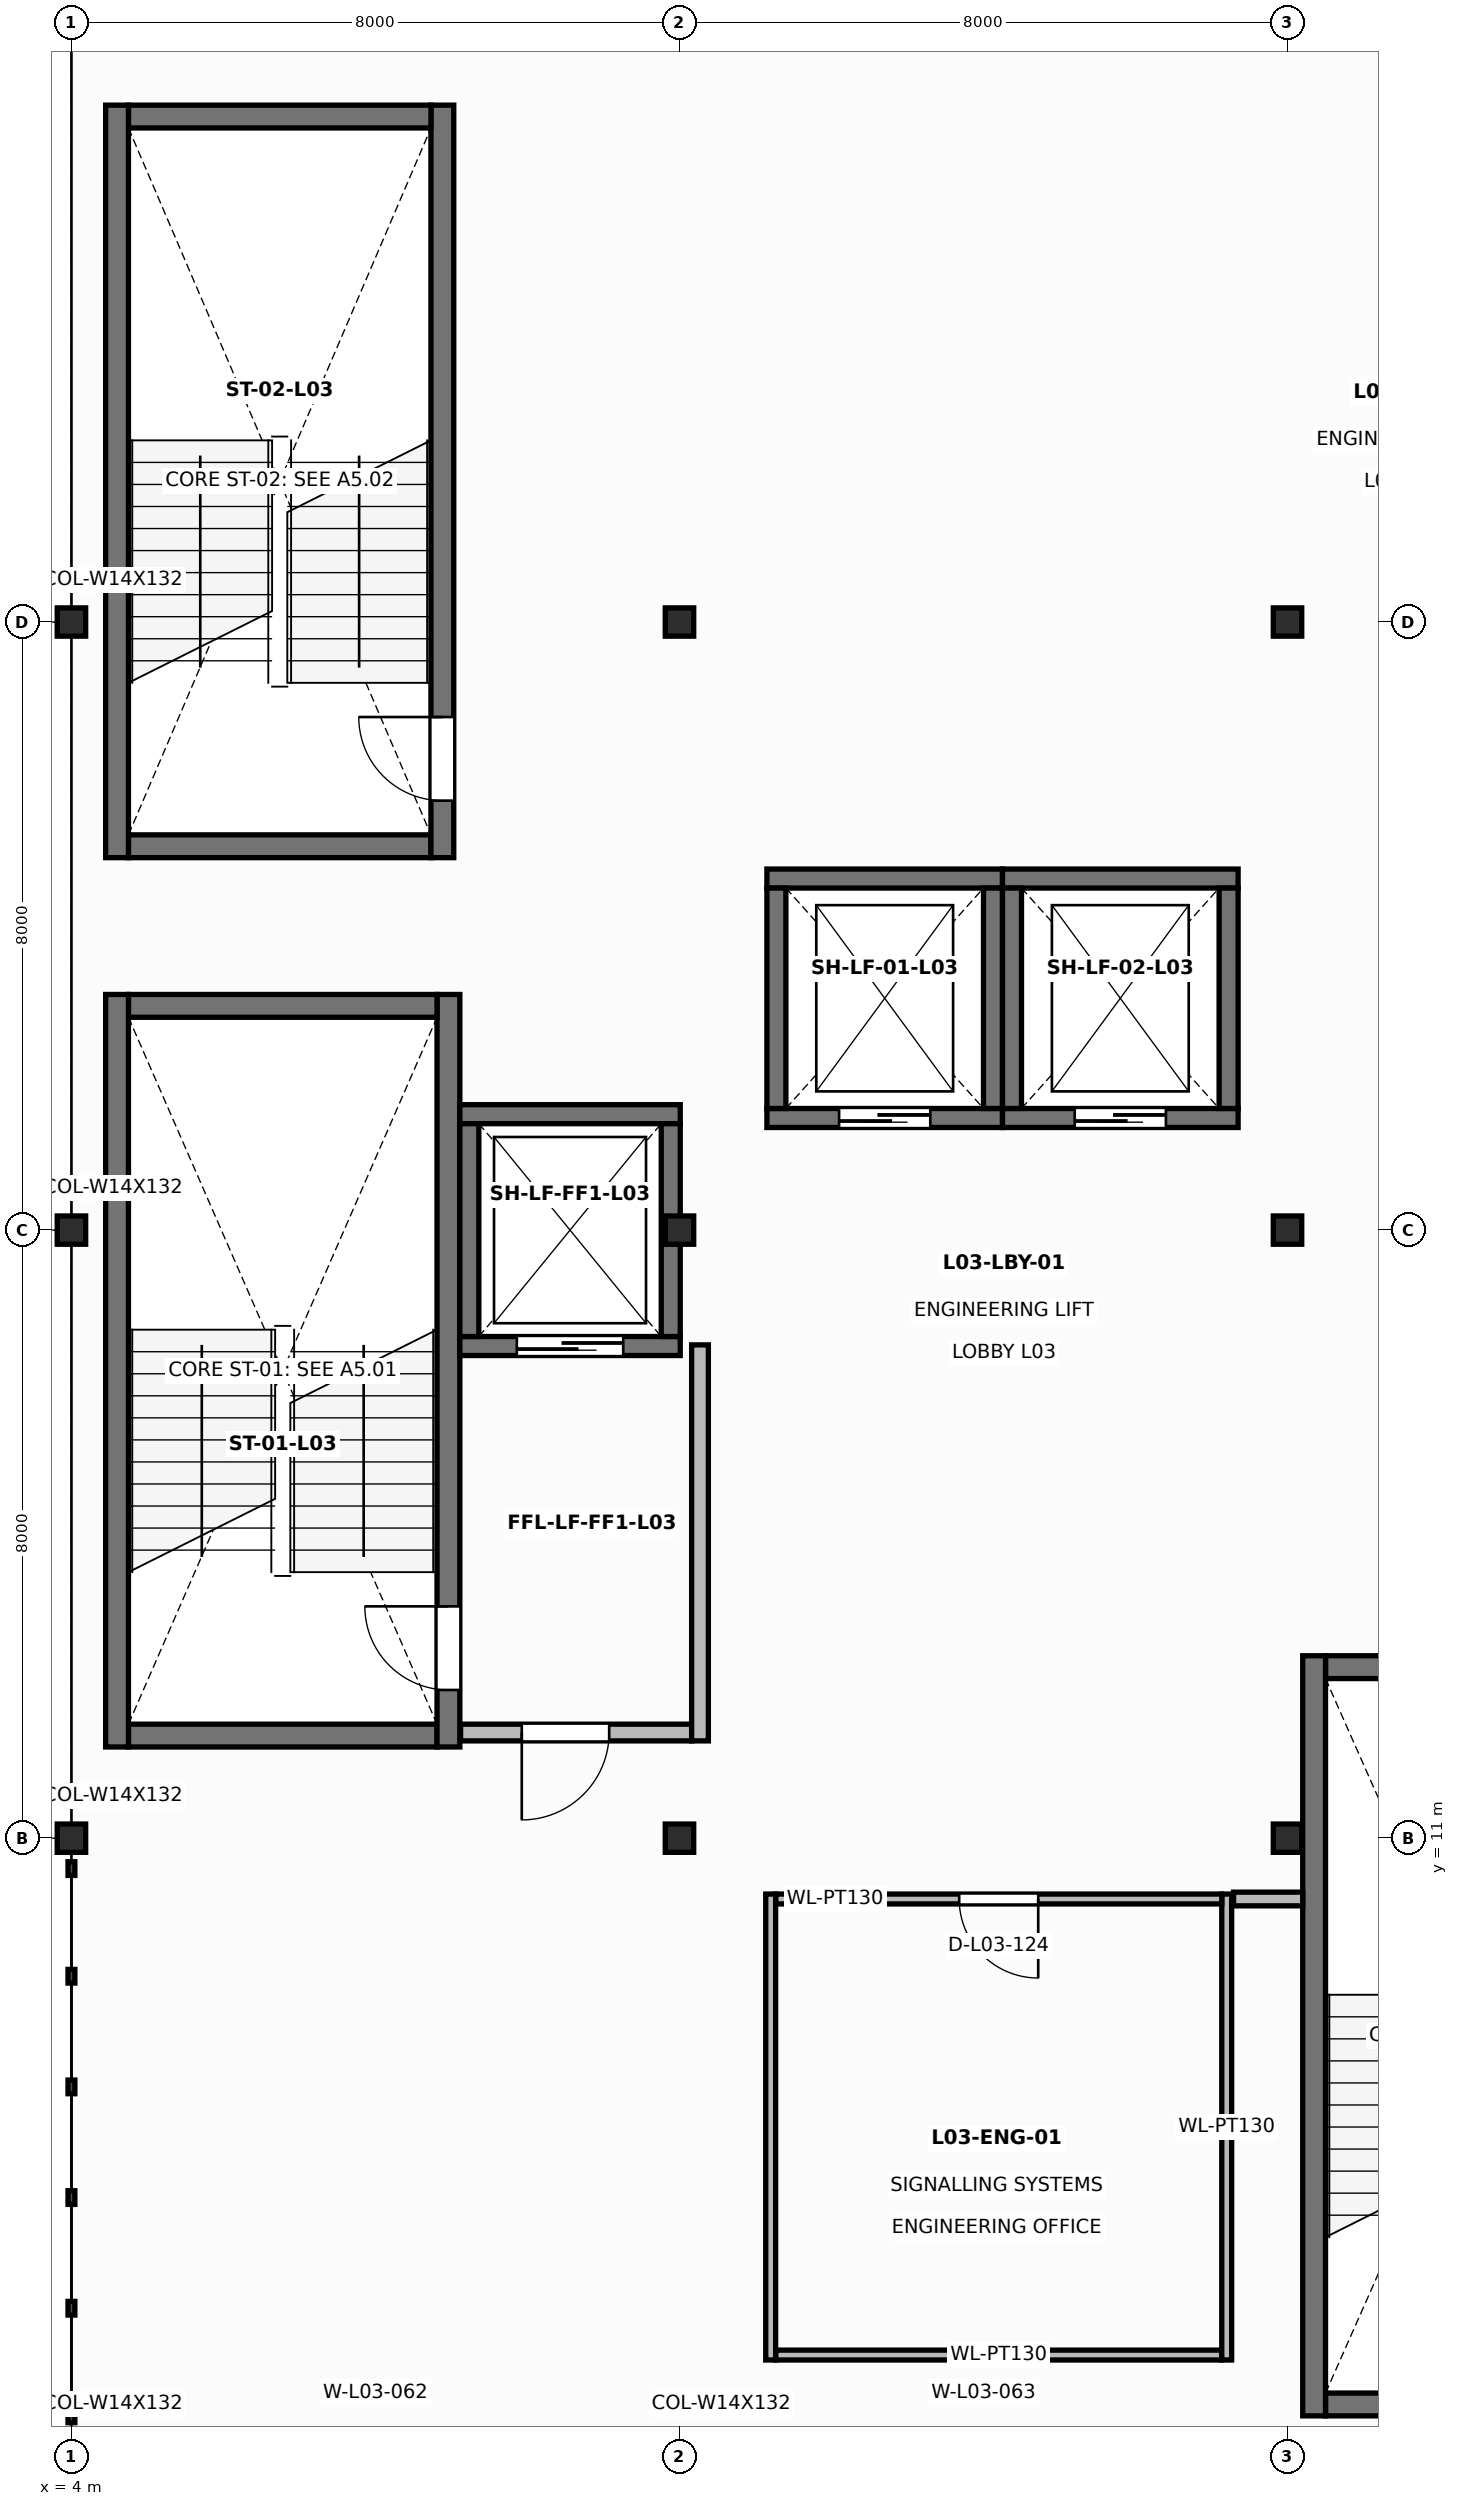
"""IFC4 building model, lengths in metres.
Left out: names, types, materials, properties, quantities, classifications, styles, units other than length and angle.
Written with IfcOpenShell. Run it as: python <this file> out.ifc"""

import sys

from ifc_helpers import new_model, si_unit, direction, frame, frame_2d, origin, origin_2d, place, context, subcontext, project, spatial, rectangle, i_section, extrude, element, fill, save


model = new_model("IFC4")
c1 = context("Model", 3, precision=1e-05, world=origin(), true_north=direction((0.0, 1.0)))
c2 = subcontext(c1, "Body", "Model", "MODEL_VIEW")
j1 = project(units=[si_unit("LENGTHUNIT", "METRE"), si_unit("PLANEANGLEUNIT", "RADIAN")], contexts=[c1])
p1 = place(None, origin())
s1 = spatial("IfcSite", under=j1, at=p1, CompositionType="ELEMENT")
p2 = place(p1, origin())
s2 = spatial("IfcBuilding", under=s1, at=p2, CompositionType="ELEMENT")
p3 = place(p2, frame((0.0, 0.0, 15.6)))
s3 = spatial("IfcBuildingStorey", under=s2, at=p3, CompositionType="ELEMENT", Elevation=15.6)
for number, where, z_axis, x_axis in (
    (1, (4.0, 11.0, 0.0), (0.0, 0.0, 1.0), (1.0, 0.0, 0.0)),
    (2, (4.0, 19.0, 0.0), (0.0, 0.0, 1.0), (1.0, 0.0, 0.0)),
    (3, (4.0, 27.0, 0.0), (0.0, 0.0, 1.0), (1.0, 0.0, 0.0)),
    (4, (12.0, 11.0, 0.0), (0.0, 0.0, 1.0), (1.0, 0.0, 0.0)),
    (5, (12.0, 19.0, 0.0), (0.0, 0.0, 1.0), (1.0, 0.0, 0.0)),
    (6, (12.0, 27.0, 0.0), (0.0, 0.0, 1.0), (1.0, 0.0, 0.0)),
    (7, (20.0, 11.0, 0.0), (0.0, 0.0, 1.0), (1.0, 0.0, 0.0)),
    (8, (20.0, 19.0, 0.0), (0.0, 0.0, 1.0), (1.0, 0.0, 0.0)),
    (9, (20.0, 27.0, 0.0), (0.0, 0.0, 1.0), (1.0, 0.0, 0.0)),
):
    element("IfcColumn", number, at=place(p3, frame(where, z_axis=z_axis, x_axis=x_axis)), inside=s3, PredefinedType="COLUMN", context=c2, shape_type="SweptSolid", body=[
        extrude(i_section(OverallWidth=0.374, OverallDepth=0.372, WebThickness=0.016, FlangeThickness=0.026, at=origin_2d()), origin(), (0.0, 0.0, 1.0), 4.2),
    ])
p4 = place(p3, frame((4.75, 12.35, 0.0), z_axis=(0.0, 0.0, 1.0), x_axis=(1.0, 0.0, 0.0)))
e10 = element("IfcWall", 10, at=p4, inside=s3, PredefinedType="SHEAR", context=c2, shape_type="SweptSolid", body=[
    extrude(rectangle(XDim=4.06, YDim=0.3, at=frame_2d((2.03, 0.0))), origin(), (0.0, 0.0, 1.0), 3.975),
])
p5 = place(p3, frame((8.96, 12.2, 0.0), z_axis=(0.0, 0.0, 1.0), x_axis=(0.0, 1.0, 0.0)))
e11 = element("IfcWall", 11, at=p5, inside=s3, PredefinedType="SHEAR", context=c2, shape_type="SweptSolid", body=[
    extrude(rectangle(XDim=9.9, YDim=0.3, at=frame_2d((4.95, 0.0))), origin(), (0.0, 0.0, 1.0), 3.975),
])
p6 = place(p5, frame((0.75, 0.0, 0.0)))
e12 = element("IfcOpeningElement", 12, at=p6, cuts=e11, PredefinedType="OPENING", context=c2, shape_type="SweptSolid", body=[
    extrude(rectangle(XDim=1.1, YDim=2.15, at=frame_2d((0.55, 1.075))), frame((0.0, 0.16, 0.0), z_axis=(0.0, -1.0, 0.0), x_axis=(1.0, 0.0, 0.0)), (0.0, 0.0, 1.0), 0.32),
])
p7 = place(p3, frame((8.81, 21.95, 0.0), z_axis=(0.0, 0.0, 1.0), x_axis=(-1.0, 0.0, 0.0)))
e13 = element("IfcWall", 13, at=p7, inside=s3, PredefinedType="SHEAR", context=c2, shape_type="SweptSolid", body=[
    extrude(rectangle(XDim=4.06, YDim=0.3, at=frame_2d((2.03, 0.0))), origin(), (0.0, 0.0, 1.0), 3.975),
])
p8 = place(p3, frame((4.6, 22.1, 0.0), z_axis=(0.0, 0.0, 1.0), x_axis=(0.0, -1.0, 0.0)))
e14 = element("IfcWall", 14, at=p8, inside=s3, PredefinedType="SHEAR", context=c2, shape_type="SweptSolid", body=[
    extrude(rectangle(XDim=9.9, YDim=0.3, at=frame_2d((4.95, 0.0))), origin(), (0.0, 0.0, 1.0), 3.975),
])
p9 = place(p3, frame((4.75, 24.05, 0.0), z_axis=(0.0, 0.0, 1.0), x_axis=(1.0, 0.0, 0.0)))
e15 = element("IfcWall", 15, at=p9, inside=s3, PredefinedType="SHEAR", context=c2, shape_type="SweptSolid", body=[
    extrude(rectangle(XDim=3.98, YDim=0.3, at=frame_2d((1.99, 0.0))), origin(), (0.0, 0.0, 1.0), 3.975),
])
p10 = place(p3, frame((8.88, 23.9, 0.0), z_axis=(0.0, 0.0, 1.0), x_axis=(0.0, 1.0, 0.0)))
e16 = element("IfcWall", 16, at=p10, inside=s3, PredefinedType="SHEAR", context=c2, shape_type="SweptSolid", body=[
    extrude(rectangle(XDim=9.9, YDim=0.3, at=frame_2d((4.95, 0.0))), origin(), (0.0, 0.0, 1.0), 3.975),
])
p11 = place(p10, frame((0.75, 0.0, 0.0)))
e17 = element("IfcOpeningElement", 17, at=p11, cuts=e16, PredefinedType="OPENING", context=c2, shape_type="SweptSolid", body=[
    extrude(rectangle(XDim=1.1, YDim=2.15, at=frame_2d((0.55, 1.075))), frame((0.0, 0.16, 0.0), z_axis=(0.0, -1.0, 0.0), x_axis=(1.0, 0.0, 0.0)), (0.0, 0.0, 1.0), 0.32),
])
p12 = place(p3, frame((8.73, 33.65, 0.0), z_axis=(0.0, 0.0, 1.0), x_axis=(-1.0, 0.0, 0.0)))
e18 = element("IfcWall", 18, at=p12, inside=s3, PredefinedType="SHEAR", context=c2, shape_type="SweptSolid", body=[
    extrude(rectangle(XDim=3.98, YDim=0.3, at=frame_2d((1.99, 0.0))), origin(), (0.0, 0.0, 1.0), 3.975),
])
p13 = place(p3, frame((4.6, 33.8, 0.0), z_axis=(0.0, 0.0, 1.0), x_axis=(0.0, -1.0, 0.0)))
e19 = element("IfcWall", 19, at=p13, inside=s3, PredefinedType="SHEAR", context=c2, shape_type="SweptSolid", body=[
    extrude(rectangle(XDim=9.9, YDim=0.3, at=frame_2d((4.95, 0.0))), origin(), (0.0, 0.0, 1.0), 3.975),
])
for number, where, z_axis, x_axis in (
    (20, (20.5, 3.55, 0.0), (0.0, 0.0, 1.0), (1.0, 0.0, 0.0)),
    (21, (24.66, 13.25, 0.0), (0.0, 0.0, 1.0), (-1.0, 0.0, 0.0)),
):
    element("IfcWall", number, at=place(p3, frame(where, z_axis=z_axis, x_axis=x_axis)), inside=s3, PredefinedType="SHEAR", context=c2, shape_type="SweptSolid", body=[
        extrude(rectangle(XDim=4.16, YDim=0.3, at=frame_2d((2.08, 0.0))), origin(), (0.0, 0.0, 1.0), 3.975),
    ])
p14 = place(p3, frame((20.35, 13.4, 0.0), z_axis=(0.0, 0.0, 1.0), x_axis=(0.0, -1.0, 0.0)))
e22 = element("IfcWall", 22, at=p14, inside=s3, PredefinedType="SHEAR", context=c2, shape_type="SweptSolid", body=[
    extrude(rectangle(XDim=10.0, YDim=0.3, at=frame_2d((5.0, 0.0))), origin(), (0.0, 0.0, 1.0), 3.975),
])
p15 = place(p3, frame((9.11, 17.475, 0.0), z_axis=(0.0, 0.0, 1.0), x_axis=(1.0, 0.0, 0.0)))
e23 = element("IfcWall", 23, at=p15, inside=s3, PredefinedType="SOLIDWALL", context=c2, shape_type="SweptSolid", body=[
    extrude(rectangle(XDim=2.9, YDim=0.25, at=frame_2d((1.45, 0.0))), origin(), (0.0, 0.0, 1.0), 3.975),
])
p16 = place(p15, frame((0.75, 0.0, 0.0)))
e24 = element("IfcOpeningElement", 24, at=p16, cuts=e23, PredefinedType="OPENING", context=c2, shape_type="SweptSolid", body=[
    extrude(rectangle(XDim=1.4, YDim=2.25, at=frame_2d((0.7, 1.125))), frame((0.0, 0.135, 0.0), z_axis=(0.0, -1.0, 0.0), x_axis=(1.0, 0.0, 0.0)), (0.0, 0.0, 1.0), 0.27),
])
p17 = place(p3, frame((12.01, 20.525, 0.0), z_axis=(0.0, 0.0, 1.0), x_axis=(-1.0, 0.0, 0.0)))
e25 = element("IfcWall", 25, at=p17, inside=s3, PredefinedType="SOLIDWALL", context=c2, shape_type="SweptSolid", body=[
    extrude(rectangle(XDim=2.9, YDim=0.25, at=frame_2d((1.45, 0.0))), origin(), (0.0, 0.0, 1.0), 3.975),
])
for number, where, z_axis, x_axis in (
    (26, (11.885, 17.6, 0.0), (0.0, 0.0, 1.0), (0.0, 1.0, 0.0)),
    (27, (9.235, 20.4, 0.0), (0.0, 0.0, 1.0), (0.0, -1.0, 0.0)),
):
    element("IfcWall", number, at=place(p3, frame(where, z_axis=z_axis, x_axis=x_axis)), inside=s3, PredefinedType="SOLIDWALL", context=c2, shape_type="SweptSolid", body=[
        extrude(rectangle(XDim=2.8, YDim=0.25, at=frame_2d((1.4, 0.0))), origin(), (0.0, 0.0, 1.0), 3.975),
    ])
p18 = place(p3, frame((9.12, 12.39, 0.0), z_axis=(0.0, 0.0, 1.0), x_axis=(1.0, 0.0, 0.0)))
e28 = element("IfcWall", 28, at=p18, inside=s3, PredefinedType="SOLIDWALL", context=c2, shape_type="SweptSolid", body=[
    extrude(rectangle(XDim=3.04, YDim=0.22, at=frame_2d((1.52, 0.0))), origin(), (0.0, 0.0, 1.0), 3.358),
])
p19 = place(p18, frame((0.805, 0.0, 0.0)))
e29 = element("IfcOpeningElement", 29, at=p19, cuts=e28, PredefinedType="OPENING", context=c2, shape_type="SweptSolid", body=[
    extrude(rectangle(XDim=1.15, YDim=2.15, at=frame_2d((0.575, 1.075))), frame((0.0, 0.12, 0.0), z_axis=(0.0, -1.0, 0.0), x_axis=(1.0, 0.0, 0.0)), (0.0, 0.0, 1.0), 0.24),
])
p20 = place(p3, frame((12.27, 12.28, 0.0), z_axis=(0.0, 0.0, 1.0), x_axis=(0.0, 1.0, 0.0)))
e30 = element("IfcWall", 30, at=p20, inside=s3, PredefinedType="SOLIDWALL", context=c2, shape_type="SweptSolid", body=[
    extrude(rectangle(XDim=5.21, YDim=0.22, at=frame_2d((2.605, 0.0))), origin(), (0.0, 0.0, 1.0), 3.975),
])
p21 = place(p3, frame((13.15, 20.475, 0.0), z_axis=(0.0, 0.0, 1.0), x_axis=(1.0, 0.0, 0.0)))
e31 = element("IfcWall", 31, at=p21, inside=s3, PredefinedType="SOLIDWALL", context=c2, shape_type="SweptSolid", body=[
    extrude(rectangle(XDim=3.1, YDim=0.25, at=frame_2d((1.55, 0.0))), origin(), (0.0, 0.0, 1.0), 3.975),
])
p22 = place(p21, frame((0.95, 0.0, 0.0)))
e32 = element("IfcOpeningElement", 32, at=p22, cuts=e31, PredefinedType="OPENING", context=c2, shape_type="SweptSolid", body=[
    extrude(rectangle(XDim=1.2, YDim=2.2, at=frame_2d((0.6, 1.1))), frame((0.0, 0.135, 0.0), z_axis=(0.0, -1.0, 0.0), x_axis=(1.0, 0.0, 0.0)), (0.0, 0.0, 1.0), 0.27),
])
p23 = place(p3, frame((16.25, 23.625, 0.0), z_axis=(0.0, 0.0, 1.0), x_axis=(-1.0, 0.0, 0.0)))
e33 = element("IfcWall", 33, at=p23, inside=s3, PredefinedType="SOLIDWALL", context=c2, shape_type="SweptSolid", body=[
    extrude(rectangle(XDim=3.1, YDim=0.25, at=frame_2d((1.55, 0.0))), origin(), (0.0, 0.0, 1.0), 3.975),
])
for number, where, z_axis, x_axis in (
    (34, (16.125, 20.6, 0.0), (0.0, 0.0, 1.0), (0.0, 1.0, 0.0)),
    (35, (13.275, 23.5, 0.0), (0.0, 0.0, 1.0), (0.0, -1.0, 0.0)),
):
    element("IfcWall", number, at=place(p3, frame(where, z_axis=z_axis, x_axis=x_axis)), inside=s3, PredefinedType="SOLIDWALL", context=c2, shape_type="SweptSolid", body=[
        extrude(rectangle(XDim=2.9, YDim=0.25, at=frame_2d((1.45, 0.0))), origin(), (0.0, 0.0, 1.0), 3.975),
    ])
p24 = place(p3, frame((16.25, 20.475, 0.0), z_axis=(0.0, 0.0, 1.0), x_axis=(1.0, 0.0, 0.0)))
e36 = element("IfcWall", 36, at=p24, inside=s3, PredefinedType="SOLIDWALL", context=c2, shape_type="SweptSolid", body=[
    extrude(rectangle(XDim=3.1, YDim=0.25, at=frame_2d((1.55, 0.0))), origin(), (0.0, 0.0, 1.0), 3.975),
])
p25 = place(p24, frame((0.95, 0.0, 0.0)))
e37 = element("IfcOpeningElement", 37, at=p25, cuts=e36, PredefinedType="OPENING", context=c2, shape_type="SweptSolid", body=[
    extrude(rectangle(XDim=1.2, YDim=2.2, at=frame_2d((0.6, 1.1))), frame((0.0, 0.135, 0.0), z_axis=(0.0, -1.0, 0.0), x_axis=(1.0, 0.0, 0.0)), (0.0, 0.0, 1.0), 0.27),
])
p26 = place(p3, frame((19.35, 23.625, 0.0), z_axis=(0.0, 0.0, 1.0), x_axis=(-1.0, 0.0, 0.0)))
e38 = element("IfcWall", 38, at=p26, inside=s3, PredefinedType="SOLIDWALL", context=c2, shape_type="SweptSolid", body=[
    extrude(rectangle(XDim=3.1, YDim=0.25, at=frame_2d((1.55, 0.0))), origin(), (0.0, 0.0, 1.0), 3.975),
])
for number, where, z_axis, x_axis in (
    (39, (19.225, 20.6, 0.0), (0.0, 0.0, 1.0), (0.0, 1.0, 0.0)),
    (40, (16.375, 23.5, 0.0), (0.0, 0.0, 1.0), (0.0, -1.0, 0.0)),
):
    element("IfcWall", number, at=place(p3, frame(where, z_axis=z_axis, x_axis=x_axis)), inside=s3, PredefinedType="SOLIDWALL", context=c2, shape_type="SweptSolid", body=[
        extrude(rectangle(XDim=2.9, YDim=0.25, at=frame_2d((1.45, 0.0))), origin(), (0.0, 0.0, 1.0), 3.975),
    ])
p27 = place(p3, frame((19.29, 10.2, 0.0), z_axis=(0.0, 0.0, 1.0), x_axis=(1.0, 0.0, 0.0)))
e41 = element("IfcWall", 41, at=p27, inside=s3, PredefinedType="PARTITIONING", context=c2, shape_type="SweptSolid", body=[
    extrude(rectangle(XDim=0.91, YDim=0.18, at=frame_2d((0.455, 0.0))), origin(), (0.0, 0.0, 1.0), 3.358),
])
p28 = place(p3, frame((13.265, 4.2, 0.0), z_axis=(0.0, 0.0, 1.0), x_axis=(1.0, 0.0, 0.0)))
e42 = element("IfcWall", 42, at=p28, inside=s3, PredefinedType="PARTITIONING", context=c2, shape_type="SweptSolid", body=[
    extrude(rectangle(XDim=5.87, YDim=0.13, at=frame_2d((2.935, 0.0))), origin(), (0.0, 0.0, 1.0), 3.9),
])
p29 = place(p3, frame((19.2, 4.135, 0.0), z_axis=(0.0, 0.0, 1.0), x_axis=(0.0, 1.0, 0.0)))
e43 = element("IfcWall", 43, at=p29, inside=s3, PredefinedType="PARTITIONING", context=c2, shape_type="SweptSolid", body=[
    extrude(rectangle(XDim=6.13, YDim=0.13, at=frame_2d((3.065, 0.0))), origin(), (0.0, 0.0, 1.0), 3.9),
])
p30 = place(p3, frame((19.135, 10.2, 0.0), z_axis=(0.0, 0.0, 1.0), x_axis=(-1.0, 0.0, 0.0)))
e44 = element("IfcWall", 44, at=p30, inside=s3, PredefinedType="PARTITIONING", context=c2, shape_type="SweptSolid", body=[
    extrude(rectangle(XDim=5.87, YDim=0.13, at=frame_2d((2.935, 0.0))), origin(), (0.0, 0.0, 1.0), 3.9),
])
p31 = place(p30, frame((2.415, 0.0, 0.0)))
e45 = element("IfcOpeningElement", 45, at=p31, cuts=e44, PredefinedType="OPENING", context=c2, shape_type="SweptSolid", body=[
    extrude(rectangle(XDim=1.04, YDim=2.16, at=frame_2d((0.52, 1.08))), frame((0.0, 0.075, 0.0), z_axis=(0.0, -1.0, 0.0), x_axis=(1.0, 0.0, 0.0)), (0.0, 0.0, 1.0), 0.15),
])
p32 = place(p3, frame((13.2, 10.265, 0.0), z_axis=(0.0, 0.0, 1.0), x_axis=(0.0, -1.0, 0.0)))
e46 = element("IfcWall", 46, at=p32, inside=s3, PredefinedType="PARTITIONING", context=c2, shape_type="SweptSolid", body=[
    extrude(rectangle(XDim=6.13, YDim=0.13, at=frame_2d((3.065, 0.0))), origin(), (0.0, 0.0, 1.0), 3.9),
])
p33 = place(p6, origin())
e47 = element("IfcDoor", 47, at=p33, inside=s3, OperationType="SINGLE_SWING_RIGHT", PredefinedType="DOOR", context=c2, shape_type="SweptSolid", body=[
    extrude(rectangle(XDim=1.1, YDim=2.15, at=frame_2d((0.55, 1.075))), frame((0.0, 0.025, 0.0), z_axis=(0.0, -1.0, 0.0), x_axis=(1.0, 0.0, 0.0)), (0.0, 0.0, 1.0), 0.05),
])
fill(e12, e47)
p34 = place(p11, origin())
e48 = element("IfcDoor", 48, at=p34, inside=s3, OperationType="SINGLE_SWING_RIGHT", PredefinedType="DOOR", context=c2, shape_type="SweptSolid", body=[
    extrude(rectangle(XDim=1.1, YDim=2.15, at=frame_2d((0.55, 1.075))), frame((0.0, 0.025, 0.0), z_axis=(0.0, -1.0, 0.0), x_axis=(1.0, 0.0, 0.0)), (0.0, 0.0, 1.0), 0.05),
])
fill(e17, e48)
p35 = place(p16, frame((1.4, 0.0, 0.0), z_axis=(0.0, 0.0, 1.0), x_axis=(-1.0, 0.0, 0.0)))
e49 = element("IfcDoor", 49, at=p35, inside=s3, OperationType="DOUBLE_DOOR_SLIDING", PredefinedType="DOOR", context=c2, shape_type="SweptSolid", body=[
    extrude(rectangle(XDim=1.4, YDim=2.25, at=frame_2d((0.7, 1.125))), frame((0.0, 0.025, 0.0), z_axis=(0.0, -1.0, 0.0), x_axis=(1.0, 0.0, 0.0)), (0.0, 0.0, 1.0), 0.05),
])
fill(e24, e49)
p36 = place(p19, frame((1.15, 0.0, 0.0), z_axis=(0.0, 0.0, 1.0), x_axis=(-1.0, 0.0, 0.0)))
e50 = element("IfcDoor", 50, at=p36, inside=s3, OperationType="SINGLE_SWING_LEFT", PredefinedType="DOOR", context=c2, shape_type="SweptSolid", body=[
    extrude(rectangle(XDim=1.15, YDim=2.15, at=frame_2d((0.575, 1.075))), frame((0.0, 0.025, 0.0), z_axis=(0.0, -1.0, 0.0), x_axis=(1.0, 0.0, 0.0)), (0.0, 0.0, 1.0), 0.05),
])
fill(e29, e50)
p37 = place(p22, frame((1.2, 0.0, 0.0), z_axis=(0.0, 0.0, 1.0), x_axis=(-1.0, 0.0, 0.0)))
e51 = element("IfcDoor", 51, at=p37, inside=s3, OperationType="DOUBLE_DOOR_SLIDING", PredefinedType="DOOR", context=c2, shape_type="SweptSolid", body=[
    extrude(rectangle(XDim=1.2, YDim=2.2, at=frame_2d((0.6, 1.1))), frame((0.0, 0.025, 0.0), z_axis=(0.0, -1.0, 0.0), x_axis=(1.0, 0.0, 0.0)), (0.0, 0.0, 1.0), 0.05),
])
fill(e32, e51)
p38 = place(p25, frame((1.2, 0.0, 0.0), z_axis=(0.0, 0.0, 1.0), x_axis=(-1.0, 0.0, 0.0)))
e52 = element("IfcDoor", 52, at=p38, inside=s3, OperationType="DOUBLE_DOOR_SLIDING", PredefinedType="DOOR", context=c2, shape_type="SweptSolid", body=[
    extrude(rectangle(XDim=1.2, YDim=2.2, at=frame_2d((0.6, 1.1))), frame((0.0, 0.025, 0.0), z_axis=(0.0, -1.0, 0.0), x_axis=(1.0, 0.0, 0.0)), (0.0, 0.0, 1.0), 0.05),
])
fill(e37, e52)
p39 = place(p31, origin())
e53 = element("IfcDoor", 53, at=p39, inside=s3, OperationType="SINGLE_SWING_LEFT", PredefinedType="DOOR", context=c2, shape_type="SweptSolid", body=[
    extrude(rectangle(XDim=1.04, YDim=2.16, at=frame_2d((0.52, 1.08))), frame((0.0, 0.025, 0.0), z_axis=(0.0, -1.0, 0.0), x_axis=(1.0, 0.0, 0.0)), (0.0, 0.0, 1.0), 0.05),
])
fill(e45, e53)
save(model, sys.argv[1])
